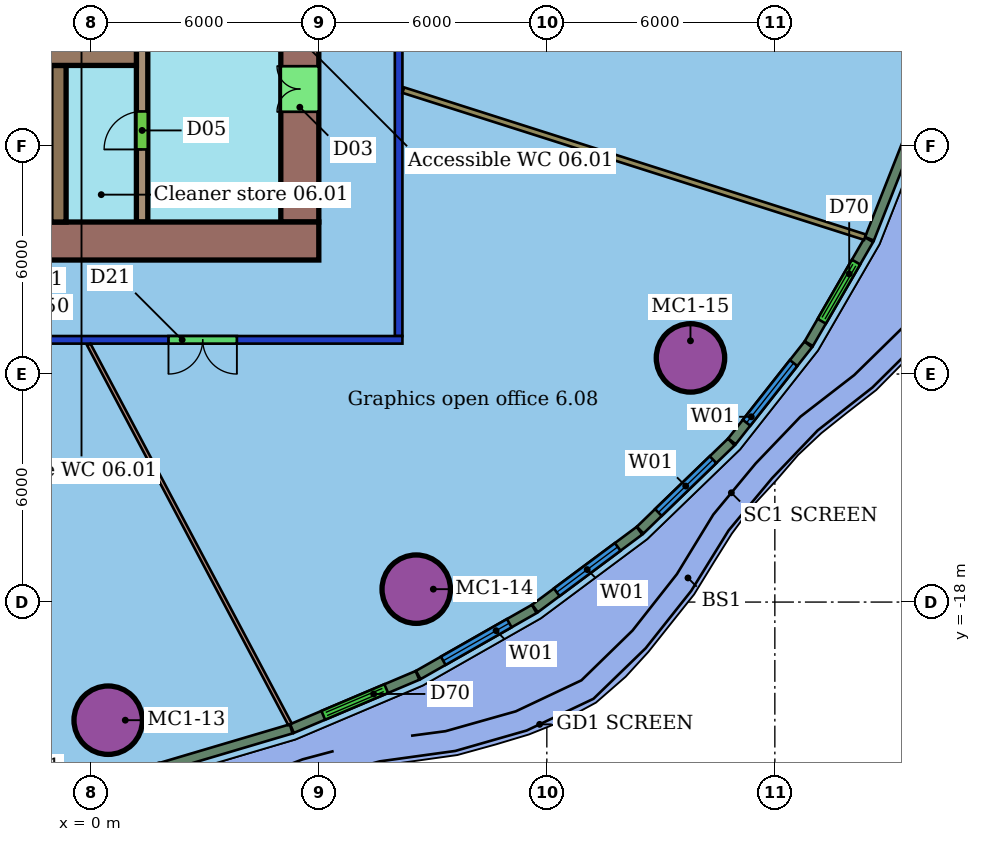
"""IFC4 building model, lengths in metres.
Left out: names, types, materials, properties, quantities, classifications, styles, units other than length and angle.
Written with IfcOpenShell. Run it as: python <this file> out.ifc"""

import sys

from ifc_helpers import new_model, si_unit, direction, frame, frame_2d, origin, origin_2d, place, context, subcontext, project, spatial, rectangle, hollow_circle, extrude, element, fill, save


model = new_model("IFC4")
c1 = context("Model", 3, precision=1e-05, world=origin(), true_north=direction((0.0, 1.0)))
c2 = subcontext(c1, "Body", "Model", "MODEL_VIEW")
j1 = project(units=[si_unit("LENGTHUNIT", "METRE"), si_unit("PLANEANGLEUNIT", "RADIAN")], contexts=[c1])
p1 = place(None, origin())
s1 = spatial("IfcSite", under=j1, at=p1, CompositionType="ELEMENT")
p2 = place(p1, origin())
s2 = spatial("IfcBuilding", under=s1, at=p2, CompositionType="ELEMENT")
p3 = place(p2, frame((0.0, 0.0, 39.7)))
s3 = spatial("IfcBuildingStorey", under=s2, at=p3, CompositionType="ELEMENT", Elevation=39.7)
for number, where, z_axis, x_axis in (
    (1, (0.458, -21.108, 0.0), (0.0, 0.0, 1.0), (1.0, 0.0, 0.0)),
    (2, (8.563, -17.66, 0.0), (0.0, 0.0, 1.0), (1.0, 0.0, 0.0)),
    (3, (15.78, -11.576, 0.0), (0.0, 0.0, 1.0), (1.0, 0.0, 0.0)),
):
    element("IfcColumn", number, at=place(p3, frame(where, z_axis=z_axis, x_axis=x_axis)), inside=s3, PredefinedType="COLUMN", context=c2, shape_type="SweptSolid", body=[
        extrude(hollow_circle(Radius=0.9, WallThickness=0.06, at=origin_2d()), origin(), (0.0, 0.0, 1.0), 3.55),
    ])
p4 = place(p3, frame((8.2, -11.1, 0.0), z_axis=(0.0, 0.0, 1.0), x_axis=(-1.0, 0.0, 0.0)))
e4 = element("IfcWall", 4, at=p4, inside=s3, PredefinedType="PARTITIONING", context=c2, shape_type="SweptSolid", body=[
    extrude(rectangle(XDim=28.4, YDim=0.2, at=frame_2d((14.2, 0.0))), origin(), (0.0, 0.0, 1.0), 2.85),
])
p5 = place(p4, frame((11.964, 0.0, 0.0)))
e5 = element("IfcOpeningElement", 5, at=p5, cuts=e4, PredefinedType="OPENING", context=c2, shape_type="SweptSolid", body=[
    extrude(rectangle(XDim=1.8, YDim=2.1, at=frame_2d((0.9, 1.05))), frame((0.0, 0.11, 0.0), z_axis=(0.0, -1.0, 0.0), x_axis=(1.0, 0.0, 0.0)), (0.0, 0.0, 1.0), 0.22),
])
p6 = place(p4, frame((4.356, 0.0, 0.0)))
e6 = element("IfcOpeningElement", 6, at=p6, cuts=e4, PredefinedType="OPENING", context=c2, shape_type="SweptSolid", body=[
    extrude(rectangle(XDim=1.8, YDim=2.1, at=frame_2d((0.9, 1.05))), frame((0.0, 0.11, 0.0), z_axis=(0.0, -1.0, 0.0), x_axis=(1.0, 0.0, 0.0)), (0.0, 0.0, 1.0), 0.22),
])
p7 = place(p3, frame((8.1, 11.0, 0.0), z_axis=(0.0, 0.0, 1.0), x_axis=(0.0, -1.0, 0.0)))
e7 = element("IfcWall", 7, at=p7, inside=s3, PredefinedType="PARTITIONING", context=c2, shape_type="SweptSolid", body=[
    extrude(rectangle(XDim=22.0, YDim=0.2, at=frame_2d((11.0, 0.0))), origin(), (0.0, 0.0, 1.0), 2.85),
])
p8 = place(p7, frame((6.036, 0.0, 0.0)))
e8 = element("IfcOpeningElement", 8, at=p8, cuts=e7, PredefinedType="OPENING", context=c2, shape_type="SweptSolid", body=[
    extrude(rectangle(XDim=1.1, YDim=2.1, at=frame_2d((0.55, 1.05))), frame((0.0, 0.11, 0.0), z_axis=(0.0, -1.0, 0.0), x_axis=(1.0, 0.0, 0.0)), (0.0, 0.0, 1.0), 0.22),
])
p9 = place(p7, frame((12.807, 0.0, 0.0)))
e9 = element("IfcOpeningElement", 9, at=p9, cuts=e7, PredefinedType="OPENING", context=c2, shape_type="SweptSolid", body=[
    extrude(rectangle(XDim=0.9, YDim=2.1, at=frame_2d((0.45, 1.05))), frame((0.0, 0.11, 0.0), z_axis=(0.0, -1.0, 0.0), x_axis=(1.0, 0.0, 0.0)), (0.0, 0.0, 1.0), 0.22),
])
p10 = place(p3, frame((5.241, -21.215, 0.0), z_axis=(0.0, 0.0, 1.0), x_axis=(-0.468204132098, 0.883620331752, 0.0)))
e10 = element("IfcWall", 10, at=p10, inside=s3, PredefinedType="PARTITIONING", context=c2, shape_type="SweptSolid", body=[
    extrude(rectangle(XDim=11.308, YDim=0.1, at=frame_2d((5.654, 0.0))), origin(), (0.0, 0.0, 1.0), 3.55),
])
p11 = place(p3, frame((20.372, -8.399, 0.0), z_axis=(0.0, 0.0, 1.0), x_axis=(-0.95285006043, 0.303441530346, 0.0)))
e11 = element("IfcWall", 11, at=p11, inside=s3, PredefinedType="PARTITIONING", context=c2, shape_type="SweptSolid", body=[
    extrude(rectangle(XDim=12.751, YDim=0.15, at=frame_2d((6.375, 0.0))), origin(), (0.0, 0.0, 1.0), 3.55),
])
p12 = place(p3, frame((1.818, -22.36, 0.0), z_axis=(0.0, 0.0, 1.0), x_axis=(0.958796062101, 0.284095250399, 0.0)))
e12 = element("IfcWall", 12, at=p12, inside=s3, PredefinedType="SOLIDWALL", context=c2, shape_type="SweptSolid", body=[
    extrude(rectangle(XDim=3.603, YDim=0.25, at=frame_2d((1.802, 0.0))), origin(), (0.0, 0.0, 1.0), 3.15),
])
p13 = place(p3, frame((5.294, -21.329, 0.0), z_axis=(0.0, 0.0, 1.0), x_axis=(0.920777409004, 0.390088404169, 0.0)))
e13 = element("IfcWall", 13, at=p13, inside=s3, PredefinedType="SOLIDWALL", context=c2, shape_type="SweptSolid", body=[
    extrude(rectangle(XDim=3.587, YDim=0.25, at=frame_2d((1.794, 0.0))), origin(), (0.0, 0.0, 1.0), 3.15),
])
p14 = place(p13, frame((0.894, 0.0, 0.0)))
e14 = element("IfcOpeningElement", 14, at=p14, cuts=e13, PredefinedType="OPENING", context=c2, shape_type="SweptSolid", body=[
    extrude(rectangle(XDim=1.8, YDim=2.4, at=frame_2d((0.9, 1.2))), frame((0.0, 0.135, 0.0), z_axis=(0.0, -1.0, 0.0), x_axis=(1.0, 0.0, 0.0)), (0.0, 0.0, 1.0), 0.27),
])
p15 = place(p3, frame((8.617, -19.919, 0.0), z_axis=(0.0, 0.0, 1.0), x_axis=(0.868943789931, 0.494910789881, 0.0)))
e15 = element("IfcWall", 15, at=p15, inside=s3, PredefinedType="SOLIDWALL", context=c2, shape_type="SweptSolid", body=[
    extrude(rectangle(XDim=3.512, YDim=0.25, at=frame_2d((1.756, 0.0))), origin(), (0.0, 0.0, 1.0), 3.15),
])
p16 = place(p15, frame((0.756, 0.0, 0.8)))
e16 = element("IfcOpeningElement", 16, at=p16, cuts=e15, PredefinedType="OPENING", context=c2, shape_type="SweptSolid", body=[
    extrude(rectangle(XDim=2.0, YDim=2.2, at=frame_2d((1.0, 1.1))), frame((0.0, 0.135, 0.0), z_axis=(0.0, -1.0, 0.0), x_axis=(1.0, 0.0, 0.0)), (0.0, 0.0, 1.0), 0.27),
])
p17 = place(p3, frame((11.689, -18.168, 0.0), z_axis=(0.0, 0.0, 1.0), x_axis=(0.802166551417, 0.597100346498, 0.0)))
e17 = element("IfcWall", 17, at=p17, inside=s3, PredefinedType="SOLIDWALL", context=c2, shape_type="SweptSolid", body=[
    extrude(rectangle(XDim=3.426, YDim=0.25, at=frame_2d((1.713, 0.0))), origin(), (0.0, 0.0, 1.0), 3.15),
])
p18 = place(p17, frame((0.713, 0.0, 0.8)))
e18 = element("IfcOpeningElement", 18, at=p18, cuts=e17, PredefinedType="OPENING", context=c2, shape_type="SweptSolid", body=[
    extrude(rectangle(XDim=2.0, YDim=2.2, at=frame_2d((1.0, 1.1))), frame((0.0, 0.135, 0.0), z_axis=(0.0, -1.0, 0.0), x_axis=(1.0, 0.0, 0.0)), (0.0, 0.0, 1.0), 0.27),
])
p19 = place(p3, frame((14.456, -16.107, 0.0), z_axis=(0.0, 0.0, 1.0), x_axis=(0.719152952807, 0.694851804682, 0.0)))
e19 = element("IfcWall", 19, at=p19, inside=s3, PredefinedType="SOLIDWALL", context=c2, shape_type="SweptSolid", body=[
    extrude(rectangle(XDim=3.335, YDim=0.25, at=frame_2d((1.668, 0.0))), origin(), (0.0, 0.0, 1.0), 3.15),
])
p20 = place(p19, frame((0.668, 0.0, 0.8)))
e20 = element("IfcOpeningElement", 20, at=p20, cuts=e19, PredefinedType="OPENING", context=c2, shape_type="SweptSolid", body=[
    extrude(rectangle(XDim=2.0, YDim=2.2, at=frame_2d((1.0, 1.1))), frame((0.0, 0.135, 0.0), z_axis=(0.0, -1.0, 0.0), x_axis=(1.0, 0.0, 0.0)), (0.0, 0.0, 1.0), 0.27),
])
p21 = place(p3, frame((16.871, -13.771, 0.0), z_axis=(0.0, 0.0, 1.0), x_axis=(0.618897546754, 0.785471722357, 0.0)))
e21 = element("IfcWall", 21, at=p21, inside=s3, PredefinedType="SOLIDWALL", context=c2, shape_type="SweptSolid", body=[
    extrude(rectangle(XDim=3.245, YDim=0.25, at=frame_2d((1.623, 0.0))), origin(), (0.0, 0.0, 1.0), 3.15),
])
p22 = place(p21, frame((0.622, 0.0, 0.8)))
e22 = element("IfcOpeningElement", 22, at=p22, cuts=e21, PredefinedType="OPENING", context=c2, shape_type="SweptSolid", body=[
    extrude(rectangle(XDim=2.0, YDim=2.2, at=frame_2d((1.0, 1.1))), frame((0.0, 0.135, 0.0), z_axis=(0.0, -1.0, 0.0), x_axis=(1.0, 0.0, 0.0)), (0.0, 0.0, 1.0), 0.27),
])
p23 = place(p3, frame((18.894, -11.2, 0.0), z_axis=(0.0, 0.0, 1.0), x_axis=(0.501203693301, 0.86532933489, 0.0)))
e23 = element("IfcWall", 23, at=p23, inside=s3, PredefinedType="SOLIDWALL", context=c2, shape_type="SweptSolid", body=[
    extrude(rectangle(XDim=3.161, YDim=0.25, at=frame_2d((1.581, 0.0))), origin(), (0.0, 0.0, 1.0), 3.15),
])
p24 = place(p23, frame((0.681, 0.0, 0.0)))
e24 = element("IfcOpeningElement", 24, at=p24, cuts=e23, PredefinedType="OPENING", context=c2, shape_type="SweptSolid", body=[
    extrude(rectangle(XDim=1.8, YDim=2.4, at=frame_2d((0.9, 1.2))), frame((0.0, 0.135, 0.0), z_axis=(0.0, -1.0, 0.0), x_axis=(1.0, 0.0, 0.0)), (0.0, 0.0, 1.0), 0.27),
])
p25 = place(p3, frame((20.49, -8.441, 0.0), z_axis=(0.0, 0.0, 1.0), x_axis=(0.367150133135, 0.93016169548, 0.0)))
e25 = element("IfcWall", 25, at=p25, inside=s3, PredefinedType="SOLIDWALL", context=c2, shape_type="SweptSolid", body=[
    extrude(rectangle(XDim=3.05, YDim=0.25, at=frame_2d((1.525, 0.0))), origin(), (0.0, 0.0, 1.0), 3.15),
])
p26 = place(p3, frame((-18.0, -8.5, 0.0), z_axis=(0.0, 0.0, 1.0), x_axis=(1.0, 0.0, 0.0)))
e26 = element("IfcWall", 26, at=p26, inside=s3, PredefinedType="SHEAR", context=c2, shape_type="SweptSolid", body=[
    extrude(rectangle(XDim=24.0, YDim=1.0, at=frame_2d((12.0, 0.0))), origin(), (0.0, 0.0, 1.0), 3.4),
])
p27 = place(p26, frame((6.0, 0.0, 0.0)))
e27 = element("IfcOpeningElement", 27, at=p27, cuts=e26, PredefinedType="OPENING", context=c2, shape_type="SweptSolid", body=[
    extrude(rectangle(XDim=1.2, YDim=2.1, at=frame_2d((0.6, 1.05))), frame((0.0, 0.51, 0.0), z_axis=(0.0, -1.0, 0.0), x_axis=(1.0, 0.0, 0.0)), (0.0, 0.0, 1.0), 1.02),
])
p28 = place(p3, frame((5.5, -8.0, 0.0), z_axis=(0.0, 0.0, 1.0), x_axis=(0.0, 1.0, 0.0)))
e28 = element("IfcWall", 28, at=p28, inside=s3, PredefinedType="SHEAR", context=c2, shape_type="SweptSolid", body=[
    extrude(rectangle(XDim=16.0, YDim=1.0, at=frame_2d((8.0, 0.0))), origin(), (0.0, 0.0, 1.0), 3.4),
])
p29 = place(p28, frame((2.9, 0.0, 0.0)))
e29 = element("IfcOpeningElement", 29, at=p29, cuts=e28, PredefinedType="OPENING", context=c2, shape_type="SweptSolid", body=[
    extrude(rectangle(XDim=1.2, YDim=2.1, at=frame_2d((0.6, 1.05))), frame((0.0, 0.51, 0.0), z_axis=(0.0, -1.0, 0.0), x_axis=(1.0, 0.0, 0.0)), (0.0, 0.0, 1.0), 1.02),
])
p30 = place(p28, frame((11.9, 0.0, 0.0)))
e30 = element("IfcOpeningElement", 30, at=p30, cuts=e28, PredefinedType="OPENING", context=c2, shape_type="SweptSolid", body=[
    extrude(rectangle(XDim=1.2, YDim=2.1, at=frame_2d((0.6, 1.05))), frame((0.0, 0.51, 0.0), z_axis=(0.0, -1.0, 0.0), x_axis=(1.0, 0.0, 0.0)), (0.0, 0.0, 1.0), 1.02),
])
p31 = place(p3, frame((-6.0, -3.58, 0.0), z_axis=(0.0, 0.0, 1.0), x_axis=(1.0, 0.0, 0.0)))
e31 = element("IfcWall", 31, at=p31, inside=s3, PredefinedType="SHEAR", context=c2, shape_type="SweptSolid", body=[
    extrude(rectangle(XDim=7.2, YDim=0.6, at=frame_2d((3.6, 0.0))), origin(), (0.0, 0.0, 1.0), 3.4),
])
p32 = place(p3, frame((1.35, -8.0, 0.0), z_axis=(0.0, 0.0, 1.0), x_axis=(0.0, 1.0, 0.0)))
e32 = element("IfcWall", 32, at=p32, inside=s3, PredefinedType="SHEAR", context=c2, shape_type="SweptSolid", body=[
    extrude(rectangle(XDim=16.0, YDim=0.3, at=frame_2d((8.0, 0.0))), origin(), (0.0, 0.0, 1.0), 3.4),
])
p33 = place(p32, frame((1.91, 0.0, 0.0)))
e33 = element("IfcOpeningElement", 33, at=p33, cuts=e32, PredefinedType="OPENING", context=c2, shape_type="SweptSolid", body=[
    extrude(rectangle(XDim=1.0, YDim=2.1, at=frame_2d((0.5, 1.05))), frame((0.0, 0.16, 0.0), z_axis=(0.0, -1.0, 0.0), x_axis=(1.0, 0.0, 0.0)), (0.0, 0.0, 1.0), 0.32),
])
p34 = place(p32, frame((7.25, 0.0, 0.0)))
e34 = element("IfcOpeningElement", 34, at=p34, cuts=e32, PredefinedType="OPENING", context=c2, shape_type="SweptSolid", body=[
    extrude(rectangle(XDim=1.5, YDim=2.1, at=frame_2d((0.75, 1.05))), frame((0.0, 0.16, 0.0), z_axis=(0.0, -1.0, 0.0), x_axis=(1.0, 0.0, 0.0)), (0.0, 0.0, 1.0), 0.32),
])
p35 = place(p3, frame((-0.85, -3.88, 0.0), z_axis=(0.0, 0.0, 1.0), x_axis=(0.0, -1.0, 0.0)))
e35 = element("IfcWall", 35, at=p35, inside=s3, PredefinedType="SHEAR", context=c2, shape_type="SweptSolid", body=[
    extrude(rectangle(XDim=4.12, YDim=0.4, at=frame_2d((2.06, 0.0))), origin(), (0.0, 0.0, 1.0), 3.4),
])
p36 = place(p6, origin())
e36 = element("IfcDoor", 36, at=p36, inside=s3, OperationType="DOUBLE_DOOR_SINGLE_SWING", PredefinedType="DOOR", context=c2, shape_type="SweptSolid", body=[
    extrude(rectangle(XDim=1.8, YDim=2.1, at=frame_2d((0.9, 1.05))), frame((0.0, 0.025, 0.0), z_axis=(0.0, -1.0, 0.0), x_axis=(1.0, 0.0, 0.0)), (0.0, 0.0, 1.0), 0.05),
])
fill(e6, e36)
p37 = place(p14, origin())
e37 = element("IfcDoor", 37, at=p37, inside=s3, OperationType="DOUBLE_DOOR_SLIDING", PredefinedType="DOOR", context=c2, shape_type="SweptSolid", body=[
    extrude(rectangle(XDim=1.8, YDim=2.4, at=frame_2d((0.9, 1.2))), frame((0.0, 0.025, 0.0), z_axis=(0.0, -1.0, 0.0), x_axis=(1.0, 0.0, 0.0)), (0.0, 0.0, 1.0), 0.05),
])
fill(e14, e37)
p38 = place(p16, origin())
e38 = element("IfcWindow", 38, at=p38, inside=s3, PartitioningType="SINGLE_PANEL", PredefinedType="WINDOW", context=c2, shape_type="SweptSolid", body=[
    extrude(rectangle(XDim=2.0, YDim=2.2, at=frame_2d((1.0, 1.1))), frame((0.0, 0.03, 0.0), z_axis=(0.0, -1.0, 0.0), x_axis=(1.0, 0.0, 0.0)), (0.0, 0.0, 1.0), 0.06),
])
fill(e16, e38)
p39 = place(p18, origin())
e39 = element("IfcWindow", 39, at=p39, inside=s3, PartitioningType="SINGLE_PANEL", PredefinedType="WINDOW", context=c2, shape_type="SweptSolid", body=[
    extrude(rectangle(XDim=2.0, YDim=2.2, at=frame_2d((1.0, 1.1))), frame((0.0, 0.03, 0.0), z_axis=(0.0, -1.0, 0.0), x_axis=(1.0, 0.0, 0.0)), (0.0, 0.0, 1.0), 0.06),
])
fill(e18, e39)
p40 = place(p20, origin())
e40 = element("IfcWindow", 40, at=p40, inside=s3, PartitioningType="SINGLE_PANEL", PredefinedType="WINDOW", context=c2, shape_type="SweptSolid", body=[
    extrude(rectangle(XDim=2.0, YDim=2.2, at=frame_2d((1.0, 1.1))), frame((0.0, 0.03, 0.0), z_axis=(0.0, -1.0, 0.0), x_axis=(1.0, 0.0, 0.0)), (0.0, 0.0, 1.0), 0.06),
])
fill(e20, e40)
p41 = place(p22, origin())
e41 = element("IfcWindow", 41, at=p41, inside=s3, PartitioningType="SINGLE_PANEL", PredefinedType="WINDOW", context=c2, shape_type="SweptSolid", body=[
    extrude(rectangle(XDim=2.0, YDim=2.2, at=frame_2d((1.0, 1.1))), frame((0.0, 0.03, 0.0), z_axis=(0.0, -1.0, 0.0), x_axis=(1.0, 0.0, 0.0)), (0.0, 0.0, 1.0), 0.06),
])
fill(e22, e41)
p42 = place(p24, origin())
e42 = element("IfcDoor", 42, at=p42, inside=s3, OperationType="DOUBLE_DOOR_SLIDING", PredefinedType="DOOR", context=c2, shape_type="SweptSolid", body=[
    extrude(rectangle(XDim=1.8, YDim=2.4, at=frame_2d((0.9, 1.2))), frame((0.0, 0.025, 0.0), z_axis=(0.0, -1.0, 0.0), x_axis=(1.0, 0.0, 0.0)), (0.0, 0.0, 1.0), 0.05),
])
fill(e24, e42)
p43 = place(p29, origin())
e43 = element("IfcDoor", 43, at=p43, inside=s3, OperationType="DOUBLE_DOOR_SINGLE_SWING", PredefinedType="NOTDEFINED", context=c2, shape_type="SweptSolid", body=[
    extrude(rectangle(XDim=1.2, YDim=2.1, at=frame_2d((0.6, 1.05))), frame((0.0, 0.025, 0.0), z_axis=(0.0, -1.0, 0.0), x_axis=(1.0, 0.0, 0.0)), (0.0, 0.0, 1.0), 0.05),
])
fill(e29, e43)
p44 = place(p33, origin())
e44 = element("IfcDoor", 44, at=p44, inside=s3, OperationType="SINGLE_SWING_LEFT", PredefinedType="NOTDEFINED", context=c2, shape_type="SweptSolid", body=[
    extrude(rectangle(XDim=1.0, YDim=2.1, at=frame_2d((0.5, 1.05))), frame((0.0, 0.025, 0.0), z_axis=(0.0, -1.0, 0.0), x_axis=(1.0, 0.0, 0.0)), (0.0, 0.0, 1.0), 0.05),
])
fill(e33, e44)
save(model, sys.argv[1])
